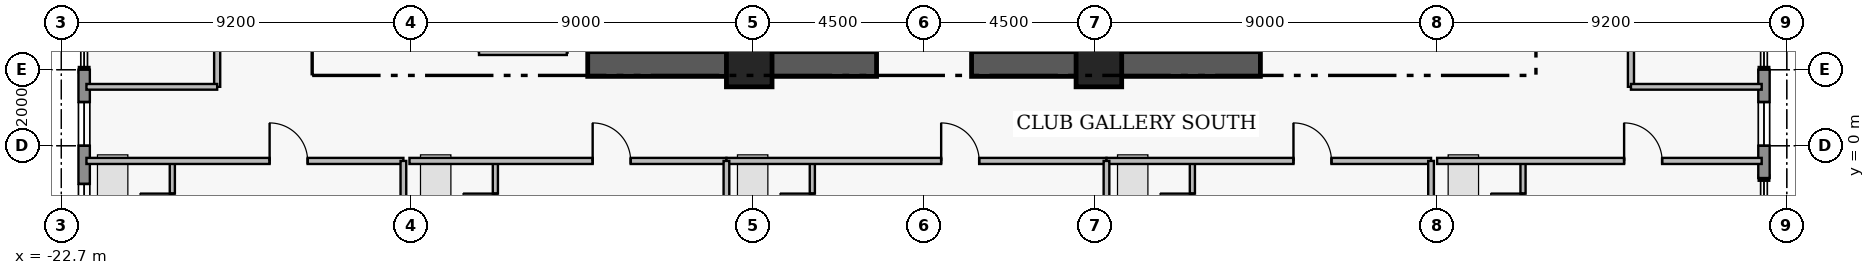
"""IFC4 building model, lengths in metres.
Left out: names, types, materials, properties, quantities, classifications, styles, units other than length and angle.
Written with IfcOpenShell. Run it as: python <this file> out.ifc"""

import sys

from ifc_helpers import new_model, si_unit, direction, frame, frame_2d, origin, origin_2d, place, context, subcontext, project, spatial, rectangle, extrude, element, fill, save


model = new_model("IFC4")
c1 = context("Model", 3, precision=1e-05, world=origin(), true_north=direction((0.0, 1.0)))
c2 = subcontext(c1, "Body", "Model", "MODEL_VIEW")
j1 = project(units=[si_unit("LENGTHUNIT", "METRE"), si_unit("PLANEANGLEUNIT", "RADIAN")], contexts=[c1])
p1 = place(None, origin())
s1 = spatial("IfcSite", under=j1, at=p1, CompositionType="ELEMENT")
p2 = place(p1, origin())
s2 = spatial("IfcBuilding", under=s1, at=p2, CompositionType="ELEMENT")
p3 = place(p2, frame((0.0, 0.0, 181.15)))
s3 = spatial("IfcBuildingStorey", under=s2, at=p3, CompositionType="ELEMENT", Elevation=181.15)
for number, where, z_axis, x_axis in (
    (1, (-8.85, 2.15, 0.0), (0.0, 0.0, 1.0), (1.0, 0.0, 0.0)),
    (2, (1.25, 2.15, 0.0), (0.0, 0.0, 1.0), (1.0, 0.0, 0.0)),
):
    element("IfcWall", number, at=place(p3, frame(where, z_axis=z_axis, x_axis=x_axis)), inside=s3, PredefinedType="SHEAR", context=c2, shape_type="SweptSolid", body=[
        extrude(rectangle(XDim=7.6, YDim=0.65, at=frame_2d((3.8, 0.0))), origin(), (0.0, 0.0, 1.0), 3.53),
    ])
for number, where, z_axis, x_axis in (
    (3, (-4.6, 2.15, 0.0), (0.0, 0.0, 1.0), (1.0, 0.0, 0.0)),
    (4, (4.6, 2.15, 0.0), (0.0, 0.0, 1.0), (1.0, 0.0, 0.0)),
):
    element("IfcColumn", number, at=place(p3, frame(where, z_axis=z_axis, x_axis=x_axis)), inside=s3, PredefinedType="COLUMN", context=c2, shape_type="SweptSolid", body=[
        extrude(rectangle(XDim=1.2, YDim=1.2, at=origin_2d()), origin(), (0.0, 0.0, 1.0), 3.75),
    ])
p4 = place(p3, frame((-22.1, -4.2, 0.0), z_axis=(0.0, 0.0, 1.0), x_axis=(0.0, 1.0, 0.0)))
e5 = element("IfcWall", 5, at=p4, inside=s3, PredefinedType="STANDARD", context=c2, shape_type="SweptSolid", body=[
    extrude(rectangle(XDim=6.2, YDim=0.3, at=frame_2d((3.1, 0.0))), origin(), (0.0, 0.0, 1.0), 3.53),
])
p5 = place(p4, frame((2.045, 0.0, 0.95)))
e6 = element("IfcOpeningElement", 6, at=p5, cuts=e5, PredefinedType="OPENING", context=c2, shape_type="SweptSolid", body=[
    extrude(rectangle(XDim=1.15, YDim=1.55, at=frame_2d((0.575, 0.775))), frame((0.0, 0.16, 0.0), z_axis=(0.0, -1.0, 0.0), x_axis=(1.0, 0.0, 0.0)), (0.0, 0.0, 1.0), 0.32),
])
p6 = place(p4, frame((4.2, 0.0, 0.95)))
e7 = element("IfcOpeningElement", 7, at=p6, cuts=e5, PredefinedType="OPENING", context=c2, shape_type="SweptSolid", body=[
    extrude(rectangle(XDim=1.15, YDim=1.55, at=frame_2d((0.575, 0.775))), frame((0.0, 0.16, 0.0), z_axis=(0.0, -1.0, 0.0), x_axis=(1.0, 0.0, 0.0)), (0.0, 0.0, 1.0), 0.32),
])
p7 = place(p3, frame((22.1, 2.0, 0.0), z_axis=(0.0, 0.0, 1.0), x_axis=(0.0, -1.0, 0.0)))
e8 = element("IfcWall", 8, at=p7, inside=s3, PredefinedType="STANDARD", context=c2, shape_type="SweptSolid", body=[
    extrude(rectangle(XDim=2.85, YDim=0.3, at=frame_2d((1.425, 0.0))), origin(), (0.0, 0.0, 1.0), 3.53),
])
p8 = place(p7, frame((0.85, 0.0, 0.95)))
e9 = element("IfcOpeningElement", 9, at=p8, cuts=e8, PredefinedType="OPENING", context=c2, shape_type="SweptSolid", body=[
    extrude(rectangle(XDim=1.15, YDim=1.55, at=frame_2d((0.575, 0.775))), frame((0.0, 0.16, 0.0), z_axis=(0.0, -1.0, 0.0), x_axis=(1.0, 0.0, 0.0)), (0.0, 0.0, 1.0), 0.32),
])
p9 = place(p3, frame((-19.78, -2.76, 0.0), z_axis=(0.0, 0.0, 1.0), x_axis=(0.0, 1.0, 0.0)))
e10 = element("IfcWall", 10, at=p9, inside=s3, PredefinedType="PLUMBINGWALL", context=c2, shape_type="SweptSolid", body=[
    extrude(rectangle(XDim=2.36, YDim=0.135, at=frame_2d((1.18, 0.0))), origin(), (0.0, 0.0, 1.0), 3.53),
])
p10 = place(p9, frame((0.65, 0.0, 0.0)))
e11 = element("IfcOpeningElement", 11, at=p10, cuts=e10, PredefinedType="OPENING", context=c2, shape_type="SweptSolid", body=[
    extrude(rectangle(XDim=0.85, YDim=2.1, at=frame_2d((0.425, 1.05))), frame((0.0, 0.077, 0.0), z_axis=(0.0, -1.0, 0.0), x_axis=(1.0, 0.0, 0.0)), (0.0, 0.0, 1.0), 0.155),
])
p11 = place(p3, frame((-22.04, -0.4, 0.0), z_axis=(0.0, 0.0, 1.0), x_axis=(1.0, 0.0, 0.0)))
e12 = element("IfcWall", 12, at=p11, inside=s3, PredefinedType="PARTITIONING", context=c2, shape_type="SweptSolid", body=[
    extrude(rectangle(XDim=8.34, YDim=0.16, at=frame_2d((4.17, 0.0))), origin(), (0.0, 0.0, 1.0), 3.53),
])
p12 = place(p11, frame((4.82, 0.0, 0.0)))
e13 = element("IfcOpeningElement", 13, at=p12, cuts=e12, PredefinedType="OPENING", context=c2, shape_type="SweptSolid", body=[
    extrude(rectangle(XDim=1.0, YDim=2.15, at=frame_2d((0.5, 1.075))), frame((0.0, 0.09, 0.0), z_axis=(0.0, -1.0, 0.0), x_axis=(1.0, 0.0, 0.0)), (0.0, 0.0, 1.0), 0.18),
])
p13 = place(p3, frame((-11.28, -2.76, 0.0), z_axis=(0.0, 0.0, 1.0), x_axis=(0.0, 1.0, 0.0)))
e14 = element("IfcWall", 14, at=p13, inside=s3, PredefinedType="PLUMBINGWALL", context=c2, shape_type="SweptSolid", body=[
    extrude(rectangle(XDim=2.36, YDim=0.135, at=frame_2d((1.18, 0.0))), origin(), (0.0, 0.0, 1.0), 3.53),
])
p14 = place(p13, frame((0.65, 0.0, 0.0)))
e15 = element("IfcOpeningElement", 15, at=p14, cuts=e14, PredefinedType="OPENING", context=c2, shape_type="SweptSolid", body=[
    extrude(rectangle(XDim=0.85, YDim=2.1, at=frame_2d((0.425, 1.05))), frame((0.0, 0.077, 0.0), z_axis=(0.0, -1.0, 0.0), x_axis=(1.0, 0.0, 0.0)), (0.0, 0.0, 1.0), 0.155),
])
p15 = place(p3, frame((-13.54, -0.4, 0.0), z_axis=(0.0, 0.0, 1.0), x_axis=(1.0, 0.0, 0.0)))
e16 = element("IfcWall", 16, at=p15, inside=s3, PredefinedType="PARTITIONING", context=c2, shape_type="SweptSolid", body=[
    extrude(rectangle(XDim=8.34, YDim=0.16, at=frame_2d((4.17, 0.0))), origin(), (0.0, 0.0, 1.0), 3.53),
])
p16 = place(p15, frame((4.82, 0.0, 0.0)))
e17 = element("IfcOpeningElement", 17, at=p16, cuts=e16, PredefinedType="OPENING", context=c2, shape_type="SweptSolid", body=[
    extrude(rectangle(XDim=1.0, YDim=2.15, at=frame_2d((0.5, 1.075))), frame((0.0, 0.09, 0.0), z_axis=(0.0, -1.0, 0.0), x_axis=(1.0, 0.0, 0.0)), (0.0, 0.0, 1.0), 0.18),
])
p17 = place(p3, frame((-2.94, -2.76, 0.0), z_axis=(0.0, 0.0, 1.0), x_axis=(0.0, 1.0, 0.0)))
e18 = element("IfcWall", 18, at=p17, inside=s3, PredefinedType="PLUMBINGWALL", context=c2, shape_type="SweptSolid", body=[
    extrude(rectangle(XDim=2.36, YDim=0.135, at=frame_2d((1.18, 0.0))), origin(), (0.0, 0.0, 1.0), 3.53),
])
p18 = place(p17, frame((0.65, 0.0, 0.0)))
e19 = element("IfcOpeningElement", 19, at=p18, cuts=e18, PredefinedType="OPENING", context=c2, shape_type="SweptSolid", body=[
    extrude(rectangle(XDim=0.85, YDim=2.1, at=frame_2d((0.425, 1.05))), frame((0.0, 0.077, 0.0), z_axis=(0.0, -1.0, 0.0), x_axis=(1.0, 0.0, 0.0)), (0.0, 0.0, 1.0), 0.155),
])
p19 = place(p3, frame((-5.2, -0.4, 0.0), z_axis=(0.0, 0.0, 1.0), x_axis=(1.0, 0.0, 0.0)))
e20 = element("IfcWall", 20, at=p19, inside=s3, PredefinedType="PARTITIONING", context=c2, shape_type="SweptSolid", body=[
    extrude(rectangle(XDim=10.0, YDim=0.16, at=frame_2d((5.0, 0.0))), origin(), (0.0, 0.0, 1.0), 3.53),
])
p20 = place(p19, frame((5.65, 0.0, 0.0)))
e21 = element("IfcOpeningElement", 21, at=p20, cuts=e20, PredefinedType="OPENING", context=c2, shape_type="SweptSolid", body=[
    extrude(rectangle(XDim=1.0, YDim=2.15, at=frame_2d((0.5, 1.075))), frame((0.0, 0.09, 0.0), z_axis=(0.0, -1.0, 0.0), x_axis=(1.0, 0.0, 0.0)), (0.0, 0.0, 1.0), 0.18),
])
p21 = place(p3, frame((7.06, -2.76, 0.0), z_axis=(0.0, 0.0, 1.0), x_axis=(0.0, 1.0, 0.0)))
e22 = element("IfcWall", 22, at=p21, inside=s3, PredefinedType="PLUMBINGWALL", context=c2, shape_type="SweptSolid", body=[
    extrude(rectangle(XDim=2.36, YDim=0.135, at=frame_2d((1.18, 0.0))), origin(), (0.0, 0.0, 1.0), 3.53),
])
p22 = place(p21, frame((0.65, 0.0, 0.0)))
e23 = element("IfcOpeningElement", 23, at=p22, cuts=e22, PredefinedType="OPENING", context=c2, shape_type="SweptSolid", body=[
    extrude(rectangle(XDim=0.85, YDim=2.1, at=frame_2d((0.425, 1.05))), frame((0.0, 0.077, 0.0), z_axis=(0.0, -1.0, 0.0), x_axis=(1.0, 0.0, 0.0)), (0.0, 0.0, 1.0), 0.155),
])
p23 = place(p3, frame((4.8, -0.4, 0.0), z_axis=(0.0, 0.0, 1.0), x_axis=(1.0, 0.0, 0.0)))
e24 = element("IfcWall", 24, at=p23, inside=s3, PredefinedType="PARTITIONING", context=c2, shape_type="SweptSolid", body=[
    extrude(rectangle(XDim=8.54, YDim=0.16, at=frame_2d((4.27, 0.0))), origin(), (0.0, 0.0, 1.0), 3.53),
])
p24 = place(p23, frame((4.92, 0.0, 0.0)))
e25 = element("IfcOpeningElement", 25, at=p24, cuts=e24, PredefinedType="OPENING", context=c2, shape_type="SweptSolid", body=[
    extrude(rectangle(XDim=1.0, YDim=2.15, at=frame_2d((0.5, 1.075))), frame((0.0, 0.09, 0.0), z_axis=(0.0, -1.0, 0.0), x_axis=(1.0, 0.0, 0.0)), (0.0, 0.0, 1.0), 0.18),
])
p25 = place(p3, frame((15.76, -2.76, 0.0), z_axis=(0.0, 0.0, 1.0), x_axis=(0.0, 1.0, 0.0)))
e26 = element("IfcWall", 26, at=p25, inside=s3, PredefinedType="PLUMBINGWALL", context=c2, shape_type="SweptSolid", body=[
    extrude(rectangle(XDim=2.36, YDim=0.135, at=frame_2d((1.18, 0.0))), origin(), (0.0, 0.0, 1.0), 3.53),
])
p26 = place(p25, frame((0.65, 0.0, 0.0)))
e27 = element("IfcOpeningElement", 27, at=p26, cuts=e26, PredefinedType="OPENING", context=c2, shape_type="SweptSolid", body=[
    extrude(rectangle(XDim=0.85, YDim=2.1, at=frame_2d((0.425, 1.05))), frame((0.0, 0.077, 0.0), z_axis=(0.0, -1.0, 0.0), x_axis=(1.0, 0.0, 0.0)), (0.0, 0.0, 1.0), 0.155),
])
p27 = place(p3, frame((13.5, -0.4, 0.0), z_axis=(0.0, 0.0, 1.0), x_axis=(1.0, 0.0, 0.0)))
e28 = element("IfcWall", 28, at=p27, inside=s3, PredefinedType="PARTITIONING", context=c2, shape_type="SweptSolid", body=[
    extrude(rectangle(XDim=8.54, YDim=0.16, at=frame_2d((4.27, 0.0))), origin(), (0.0, 0.0, 1.0), 3.53),
])
p28 = place(p27, frame((4.92, 0.0, 0.0)))
e29 = element("IfcOpeningElement", 29, at=p28, cuts=e28, PredefinedType="OPENING", context=c2, shape_type="SweptSolid", body=[
    extrude(rectangle(XDim=1.0, YDim=2.15, at=frame_2d((0.5, 1.075))), frame((0.0, 0.09, 0.0), z_axis=(0.0, -1.0, 0.0), x_axis=(1.0, 0.0, 0.0)), (0.0, 0.0, 1.0), 0.18),
])
p29 = place(p3, frame((18.6, 1.55, 0.0), z_axis=(0.0, 0.0, 1.0), x_axis=(0.0, 1.0, 0.0)))
e30 = element("IfcWall", 30, at=p29, inside=s3, PredefinedType="PARTITIONING", context=c2, shape_type="SweptSolid", body=[
    extrude(rectangle(XDim=6.25, YDim=0.16, at=frame_2d((3.125, 0.0))), origin(), (0.0, 0.0, 1.0), 3.53),
])
p30 = place(p29, frame((2.665, 0.0, 0.0)))
e31 = element("IfcOpeningElement", 31, at=p30, cuts=e30, PredefinedType="OPENING", context=c2, shape_type="SweptSolid", body=[
    extrude(rectangle(XDim=0.92, YDim=2.12, at=frame_2d((0.46, 1.06))), frame((0.0, 0.09, 0.0), z_axis=(0.0, -1.0, 0.0), x_axis=(1.0, 0.0, 0.0)), (0.0, 0.0, 1.0), 0.18),
])
p31 = place(p3, frame((-18.6, 1.55, 0.0), z_axis=(0.0, 0.0, 1.0), x_axis=(0.0, 1.0, 0.0)))
e32 = element("IfcWall", 32, at=p31, inside=s3, PredefinedType="PARTITIONING", context=c2, shape_type="SweptSolid", body=[
    extrude(rectangle(XDim=13.3, YDim=0.16, at=frame_2d((6.65, 0.0))), origin(), (0.0, 0.0, 1.0), 3.53),
])
p32 = place(p31, frame((6.175, 0.0, 0.0)))
e33 = element("IfcOpeningElement", 33, at=p32, cuts=e32, PredefinedType="OPENING", context=c2, shape_type="SweptSolid", body=[
    extrude(rectangle(XDim=0.95, YDim=2.15, at=frame_2d((0.475, 1.075))), frame((0.0, 0.09, 0.0), z_axis=(0.0, -1.0, 0.0), x_axis=(1.0, 0.0, 0.0)), (0.0, 0.0, 1.0), 0.18),
])
p33 = place(p3, frame((-11.71, 2.47, 0.0), z_axis=(0.0, 0.0, 1.0), x_axis=(1.0, 0.0, 0.0)))
e34 = element("IfcWall", 34, at=p33, inside=s3, PredefinedType="PARTITIONING", context=c2, shape_type="SweptSolid", body=[
    extrude(rectangle(XDim=2.31, YDim=0.165, at=frame_2d((1.155, 0.0))), origin(), (0.0, 0.0, 1.0), 2.43),
])
p34 = place(p3, frame((-13.7, -7.52, 0.0), z_axis=(0.0, 0.0, 1.0), x_axis=(0.0, 1.0, 0.0)))
e35 = element("IfcWall", 35, at=p34, inside=s3, PredefinedType="PARTITIONING", context=c2, shape_type="SweptSolid", body=[
    extrude(rectangle(XDim=7.12, YDim=0.15, at=frame_2d((3.56, 0.0))), origin(), (0.0, 0.0, 1.0), 2.923),
])
p35 = place(p3, frame((-5.2, -7.52, 0.0), z_axis=(0.0, 0.0, 1.0), x_axis=(0.0, 1.0, 0.0)))
e36 = element("IfcWall", 36, at=p35, inside=s3, PredefinedType="PARTITIONING", context=c2, shape_type="SweptSolid", body=[
    extrude(rectangle(XDim=7.12, YDim=0.15, at=frame_2d((3.56, 0.0))), origin(), (0.0, 0.0, 1.0), 3.53),
])
for number, where, z_axis, x_axis in (
    (37, (4.8, -7.52, 0.0), (0.0, 0.0, 1.0), (0.0, 1.0, 0.0)),
    (38, (13.34, -7.52, 0.0), (0.0, 0.0, 1.0), (0.0, 1.0, 0.0)),
):
    element("IfcWall", number, at=place(p3, frame(where, z_axis=z_axis, x_axis=x_axis)), inside=s3, PredefinedType="PARTITIONING", context=c2, shape_type="SweptSolid", body=[
        extrude(rectangle(XDim=7.12, YDim=0.15, at=frame_2d((3.56, 0.0))), origin(), (0.0, 0.0, 1.0), 2.923),
    ])
for number, where, z_axis, x_axis in (
    (39, (18.6, 1.55, 0.0), (0.0, 0.0, 1.0), (1.0, 0.0, 0.0)),
    (40, (-22.04, 1.55, 0.0), (0.0, 0.0, 1.0), (1.0, 0.0, 0.0)),
):
    element("IfcWall", number, at=place(p3, frame(where, z_axis=z_axis, x_axis=x_axis)), inside=s3, PredefinedType="PARTITIONING", context=c2, shape_type="SweptSolid", body=[
        extrude(rectangle(XDim=3.44, YDim=0.15, at=frame_2d((1.72, 0.0))), origin(), (0.0, 0.0, 1.0), 3.53),
    ])
p36 = place(p5, origin())
e41 = element("IfcWindow", 41, at=p36, inside=s3, PartitioningType="SINGLE_PANEL", PredefinedType="WINDOW", context=c2, shape_type="SweptSolid", body=[
    extrude(rectangle(XDim=1.15, YDim=1.55, at=frame_2d((0.575, 0.775))), frame((0.0, 0.03, 0.0), z_axis=(0.0, -1.0, 0.0), x_axis=(1.0, 0.0, 0.0)), (0.0, 0.0, 1.0), 0.06),
])
fill(e6, e41)
p37 = place(p6, origin())
e42 = element("IfcWindow", 42, at=p37, inside=s3, PartitioningType="SINGLE_PANEL", PredefinedType="WINDOW", context=c2, shape_type="SweptSolid", body=[
    extrude(rectangle(XDim=1.15, YDim=1.55, at=frame_2d((0.575, 0.775))), frame((0.0, 0.03, 0.0), z_axis=(0.0, -1.0, 0.0), x_axis=(1.0, 0.0, 0.0)), (0.0, 0.0, 1.0), 0.06),
])
fill(e7, e42)
p38 = place(p8, origin())
e43 = element("IfcWindow", 43, at=p38, inside=s3, PartitioningType="SINGLE_PANEL", PredefinedType="WINDOW", context=c2, shape_type="SweptSolid", body=[
    extrude(rectangle(XDim=1.15, YDim=1.55, at=frame_2d((0.575, 0.775))), frame((0.0, 0.03, 0.0), z_axis=(0.0, -1.0, 0.0), x_axis=(1.0, 0.0, 0.0)), (0.0, 0.0, 1.0), 0.06),
])
fill(e9, e43)
p39 = place(p10, origin())
e44 = element("IfcDoor", 44, at=p39, inside=s3, OperationType="SINGLE_SWING_RIGHT", PredefinedType="DOOR", context=c2, shape_type="SweptSolid", body=[
    extrude(rectangle(XDim=0.85, YDim=2.1, at=frame_2d((0.425, 1.05))), frame((0.0, 0.025, 0.0), z_axis=(0.0, -1.0, 0.0), x_axis=(1.0, 0.0, 0.0)), (0.0, 0.0, 1.0), 0.05),
])
fill(e11, e44)
p40 = place(p12, origin())
e45 = element("IfcDoor", 45, at=p40, inside=s3, OperationType="SINGLE_SWING_LEFT", PredefinedType="DOOR", context=c2, shape_type="SweptSolid", body=[
    extrude(rectangle(XDim=1.0, YDim=2.15, at=frame_2d((0.5, 1.075))), frame((0.0, 0.025, 0.0), z_axis=(0.0, -1.0, 0.0), x_axis=(1.0, 0.0, 0.0)), (0.0, 0.0, 1.0), 0.05),
])
fill(e13, e45)
p41 = place(p14, origin())
e46 = element("IfcDoor", 46, at=p41, inside=s3, OperationType="SINGLE_SWING_RIGHT", PredefinedType="DOOR", context=c2, shape_type="SweptSolid", body=[
    extrude(rectangle(XDim=0.85, YDim=2.1, at=frame_2d((0.425, 1.05))), frame((0.0, 0.025, 0.0), z_axis=(0.0, -1.0, 0.0), x_axis=(1.0, 0.0, 0.0)), (0.0, 0.0, 1.0), 0.05),
])
fill(e15, e46)
p42 = place(p16, origin())
e47 = element("IfcDoor", 47, at=p42, inside=s3, OperationType="SINGLE_SWING_LEFT", PredefinedType="DOOR", context=c2, shape_type="SweptSolid", body=[
    extrude(rectangle(XDim=1.0, YDim=2.15, at=frame_2d((0.5, 1.075))), frame((0.0, 0.025, 0.0), z_axis=(0.0, -1.0, 0.0), x_axis=(1.0, 0.0, 0.0)), (0.0, 0.0, 1.0), 0.05),
])
fill(e17, e47)
p43 = place(p18, origin())
e48 = element("IfcDoor", 48, at=p43, inside=s3, OperationType="SINGLE_SWING_RIGHT", PredefinedType="DOOR", context=c2, shape_type="SweptSolid", body=[
    extrude(rectangle(XDim=0.85, YDim=2.1, at=frame_2d((0.425, 1.05))), frame((0.0, 0.025, 0.0), z_axis=(0.0, -1.0, 0.0), x_axis=(1.0, 0.0, 0.0)), (0.0, 0.0, 1.0), 0.05),
])
fill(e19, e48)
p44 = place(p20, origin())
e49 = element("IfcDoor", 49, at=p44, inside=s3, OperationType="SINGLE_SWING_LEFT", PredefinedType="DOOR", context=c2, shape_type="SweptSolid", body=[
    extrude(rectangle(XDim=1.0, YDim=2.15, at=frame_2d((0.5, 1.075))), frame((0.0, 0.025, 0.0), z_axis=(0.0, -1.0, 0.0), x_axis=(1.0, 0.0, 0.0)), (0.0, 0.0, 1.0), 0.05),
])
fill(e21, e49)
p45 = place(p22, origin())
e50 = element("IfcDoor", 50, at=p45, inside=s3, OperationType="SINGLE_SWING_RIGHT", PredefinedType="DOOR", context=c2, shape_type="SweptSolid", body=[
    extrude(rectangle(XDim=0.85, YDim=2.1, at=frame_2d((0.425, 1.05))), frame((0.0, 0.025, 0.0), z_axis=(0.0, -1.0, 0.0), x_axis=(1.0, 0.0, 0.0)), (0.0, 0.0, 1.0), 0.05),
])
fill(e23, e50)
p46 = place(p24, origin())
e51 = element("IfcDoor", 51, at=p46, inside=s3, OperationType="SINGLE_SWING_LEFT", PredefinedType="DOOR", context=c2, shape_type="SweptSolid", body=[
    extrude(rectangle(XDim=1.0, YDim=2.15, at=frame_2d((0.5, 1.075))), frame((0.0, 0.025, 0.0), z_axis=(0.0, -1.0, 0.0), x_axis=(1.0, 0.0, 0.0)), (0.0, 0.0, 1.0), 0.05),
])
fill(e25, e51)
p47 = place(p26, origin())
e52 = element("IfcDoor", 52, at=p47, inside=s3, OperationType="SINGLE_SWING_RIGHT", PredefinedType="DOOR", context=c2, shape_type="SweptSolid", body=[
    extrude(rectangle(XDim=0.85, YDim=2.1, at=frame_2d((0.425, 1.05))), frame((0.0, 0.025, 0.0), z_axis=(0.0, -1.0, 0.0), x_axis=(1.0, 0.0, 0.0)), (0.0, 0.0, 1.0), 0.05),
])
fill(e27, e52)
p48 = place(p28, origin())
e53 = element("IfcDoor", 53, at=p48, inside=s3, OperationType="SINGLE_SWING_LEFT", PredefinedType="DOOR", context=c2, shape_type="SweptSolid", body=[
    extrude(rectangle(XDim=1.0, YDim=2.15, at=frame_2d((0.5, 1.075))), frame((0.0, 0.025, 0.0), z_axis=(0.0, -1.0, 0.0), x_axis=(1.0, 0.0, 0.0)), (0.0, 0.0, 1.0), 0.05),
])
fill(e29, e53)
save(model, sys.argv[1])
